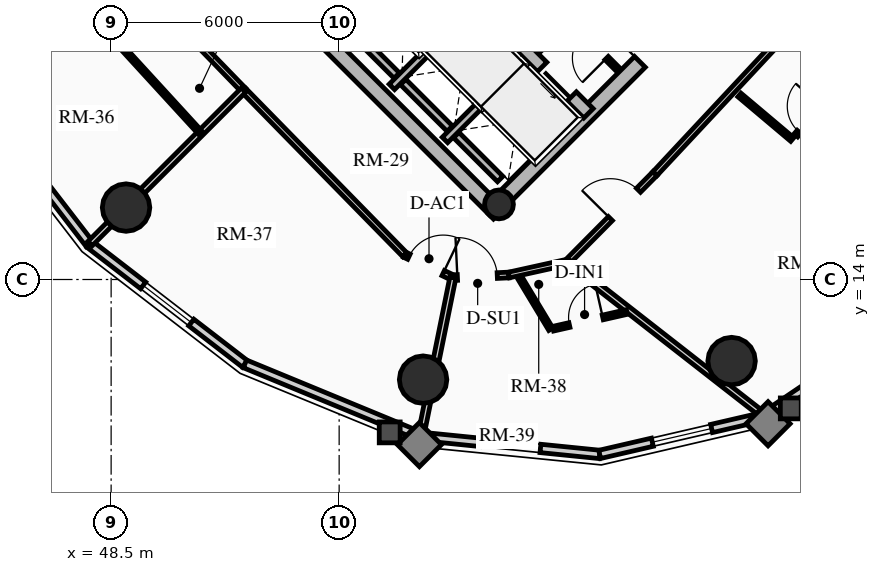
"""IFC4 building model, lengths in metres.
Left out: names, types, materials, properties, quantities, classifications, styles, units other than length and angle.
Written with IfcOpenShell. Run it as: python <this file> out.ifc"""

import sys

from ifc_helpers import new_model, si_unit, direction, frame, frame_2d, origin, origin_2d, place, context, subcontext, project, spatial, rectangle, circle, hollow_circle, extrude, source, transform, mapped, element, fill, save


model = new_model("IFC4")
c1 = context("Model", 3, precision=1e-05, world=origin(), true_north=direction((0.0, 1.0)))
c2 = subcontext(c1, "Body", "Model", "MODEL_VIEW")
j1 = project(units=[si_unit("LENGTHUNIT", "METRE"), si_unit("PLANEANGLEUNIT", "RADIAN")], contexts=[c1])
p1 = place(None, origin())
s1 = spatial("IfcSite", under=j1, at=p1, CompositionType="ELEMENT")
p2 = place(p1, origin())
s2 = spatial("IfcBuilding", under=s1, at=p2, CompositionType="ELEMENT")
p3 = place(p2, frame((0.0, 0.0, 177.79)))
s3 = spatial("IfcBuildingStorey", under=s2, at=p3, CompositionType="ELEMENT", Elevation=177.79)
p4 = place(p3, frame((58.702, 15.732, 0.0), z_axis=(0.0, 0.0, 1.0), x_axis=(-0.707106781187, 0.707106781187, 0.0)))
e1 = element("IfcWall", 1, at=p4, inside=s3, PredefinedType="SHEAR", context=c2, shape_type="SweptSolid", body=[
    extrude(rectangle(XDim=14.1, YDim=0.4, at=frame_2d((7.05, 0.0))), origin(), (0.0, 0.0, 1.0), 2.91),
])
p5 = place(p3, frame((58.561, 15.873, 0.0), z_axis=(0.0, 0.0, 1.0), x_axis=(0.707106781187, 0.707106781187, 0.0)))
e2 = element("IfcWall", 2, at=p5, inside=s3, PredefinedType="SHEAR", context=c2, shape_type="SweptSolid", body=[
    extrude(rectangle(XDim=10.7, YDim=0.4, at=frame_2d((5.35, 0.0))), origin(), (0.0, 0.0, 1.0), 2.91),
])
m1 = source(origin(), c2, "Body", "SweptSolid", [
    extrude(rectangle(XDim=1.5, YDim=2.02, at=frame_2d((0.75, 1.01))), frame((0.0, 0.21, 0.0), z_axis=(0.0, -1.0, 0.0), x_axis=(1.0, 0.0, 0.0)), (0.0, 0.0, 1.0), 0.42),
])
p6 = place(p5, frame((5.45, 0.0, 0.0)))
e3 = element("IfcOpeningElement", 3, at=p6, cuts=e2, PredefinedType="OPENING", context=c2, shape_type="MappedRepresentation", body=[
    mapped(m1, transform((0.0, 0.0, 0.0), x_axis=(1.0, 0.0, 0.0), y_axis=(0.0, 1.0, 0.0), z_axis=(0.0, 0.0, 1.0), scale=1.0)),
])
p7 = place(p3, frame((61.06, 18.373, 0.0), z_axis=(0.0, 0.0, 1.0), x_axis=(-0.707106781187, 0.707106781187, 0.0)))
e4 = element("IfcWall", 4, at=p7, inside=s3, PredefinedType="SHEAR", context=c2, shape_type="SweptSolid", body=[
    extrude(rectangle(XDim=13.7, YDim=0.35, at=frame_2d((6.85, 0.0))), origin(), (0.0, 0.0, 1.0), 2.91),
])
m2 = source(origin(), c2, "Body", "SweptSolid", [
    extrude(rectangle(XDim=1.1, YDim=2.015, at=frame_2d((0.55, 1.007))), frame((0.0, 0.185, 0.0), z_axis=(0.0, -1.0, 0.0), x_axis=(1.0, 0.0, 0.0)), (0.0, 0.0, 1.0), 0.37),
])
p8 = place(p7, frame((4.85, 0.0, 0.0)))
e5 = element("IfcOpeningElement", 5, at=p8, cuts=e4, PredefinedType="OPENING", context=c2, shape_type="MappedRepresentation", body=[
    mapped(m2, transform((0.0, 0.0, 0.0), x_axis=(1.0, 0.0, 0.0), y_axis=(0.0, 1.0, 0.0), z_axis=(0.0, 0.0, 1.0), scale=1.0)),
])
p9 = place(p7, frame((0.625, 0.0, 0.0)))
e6 = element("IfcOpeningElement", 6, at=p9, cuts=e4, PredefinedType="OPENING", context=c2, shape_type="MappedRepresentation", body=[
    mapped(m2, transform((0.0, 0.0, 0.0), x_axis=(1.0, 0.0, 0.0), y_axis=(0.0, 1.0, 0.0), z_axis=(0.0, 0.0, 1.0), scale=1.0)),
])
p10 = place(p7, frame((2.625, 0.0, 0.0)))
e7 = element("IfcOpeningElement", 7, at=p10, cuts=e4, PredefinedType="OPENING", context=c2, shape_type="MappedRepresentation", body=[
    mapped(m2, transform((0.0, 0.0, 0.0), x_axis=(1.0, 0.0, 0.0), y_axis=(0.0, 1.0, 0.0), z_axis=(0.0, 0.0, 1.0), scale=1.0)),
])
m3 = source(origin(), c2, "Body", "SweptSolid", [
    extrude(rectangle(XDim=1.15, YDim=2.02, at=frame_2d((0.575, 1.01))), frame((0.0, 0.185, 0.0), z_axis=(0.0, -1.0, 0.0), x_axis=(1.0, 0.0, 0.0)), (0.0, 0.0, 1.0), 0.37),
])
p11 = place(p7, frame((7.27, 0.0, 0.0)))
e8 = element("IfcOpeningElement", 8, at=p11, cuts=e4, PredefinedType="OPENING", context=c2, shape_type="MappedRepresentation", body=[
    mapped(m3, transform((0.0, 0.0, 0.0), x_axis=(1.0, 0.0, 0.0), y_axis=(0.0, 1.0, 0.0), z_axis=(0.0, 0.0, 1.0), scale=1.0)),
])
p12 = place(p3, frame((58.706, 15.976, 0.0), z_axis=(0.0, 0.0, 1.0), x_axis=(0.707106781187, 0.707106781187, 0.0)))
e9 = element("IfcColumn", 9, at=p12, inside=s3, PredefinedType="COLUMN", context=c2, shape_type="SweptSolid", body=[
    extrude(hollow_circle(Radius=0.38, WallThickness=0.032, at=origin_2d()), origin(), (0.0, 0.0, 1.0), 2.91),
])
for number, where, z_axis, x_axis in (
    (10, (48.893, 15.893, 0.0), (0.0, 0.0, 1.0), (1.0, 0.0, 0.0)),
    (11, (56.709, 11.365, 0.0), (0.0, 0.0, 1.0), (1.0, 0.0, 0.0)),
    (12, (64.827, 11.854, 0.0), (0.0, 0.0, 1.0), (1.0, 0.0, 0.0)),
):
    element("IfcColumn", number, at=place(p3, frame(where, z_axis=z_axis, x_axis=x_axis)), inside=s3, PredefinedType="USERDEFINED", context=c2, shape_type="SweptSolid", body=[
        extrude(circle(Radius=0.625, at=origin_2d()), origin(), (0.0, 0.0, 1.0), 2.91),
    ])
p13 = place(p3, frame((47.932, 14.932, 0.0), z_axis=(0.0, 0.0, 1.0), x_axis=(-0.610569654715, 0.791962560189, 0.0)))
e13 = element("IfcWall", 13, at=p13, inside=s3, PredefinedType="SOLIDWALL", context=c2, shape_type="SweptSolid", body=[
    extrude(rectangle(XDim=5.163, YDim=0.22, at=frame_2d((2.582, 0.0))), origin(), (0.0, 0.0, 1.0), 2.245),
])
p14 = place(p3, frame((52.021, 11.78, 0.0), z_axis=(0.0, 0.0, 1.0), x_axis=(-0.791962560189, 0.610569654715, 0.0)))
e14 = element("IfcWall", 14, at=p14, inside=s3, PredefinedType="SOLIDWALL", context=c2, shape_type="SweptSolid", body=[
    extrude(rectangle(XDim=5.163, YDim=0.22, at=frame_2d((2.582, 0.0))), origin(), (0.0, 0.0, 1.0), 2.245),
])
m4 = source(origin(), c2, "Body", "SweptSolid", [
    extrude(rectangle(XDim=1.6, YDim=1.3, at=frame_2d((0.8, 0.65))), frame((0.0, 0.12, 0.0), z_axis=(0.0, -1.0, 0.0), x_axis=(1.0, 0.0, 0.0)), (0.0, 0.0, 1.0), 0.24),
])
p15 = place(p14, frame((1.782, 0.0, 0.65)))
e15 = element("IfcOpeningElement", 15, at=p15, cuts=e14, PredefinedType="OPENING", context=c2, shape_type="MappedRepresentation", body=[
    mapped(m4, transform((0.0, 0.0, 0.0), x_axis=(1.0, 0.0, 0.0), y_axis=(0.0, 1.0, 0.0), z_axis=(0.0, 0.0, 1.0), scale=1.0)),
])
p16 = place(p3, frame((56.646, 9.873, 0.0), z_axis=(0.0, 0.0, 1.0), x_axis=(-0.924494066201, 0.381196434348, 0.0)))
e16 = element("IfcWall", 16, at=p16, inside=s3, PredefinedType="SOLIDWALL", context=c2, shape_type="SweptSolid", body=[
    extrude(rectangle(XDim=5.003, YDim=0.22, at=frame_2d((2.501, 0.0))), origin(), (0.0, 0.0, 1.0), 2.245),
])
p17 = place(p3, frame((61.355, 9.397, 0.0), z_axis=(0.0, 0.0, 1.0), x_axis=(-0.994943283129, 0.100438356004, 0.0)))
e17 = element("IfcWall", 17, at=p17, inside=s3, PredefinedType="SOLIDWALL", context=c2, shape_type="SweptSolid", body=[
    extrude(rectangle(XDim=4.733, YDim=0.22, at=frame_2d((2.366, 0.0))), origin(), (0.0, 0.0, 1.0), 2.245),
])
p18 = place(p17, frame((1.566, 0.0, 0.65)))
e18 = element("IfcOpeningElement", 18, at=p18, cuts=e17, PredefinedType="OPENING", context=c2, shape_type="MappedRepresentation", body=[
    mapped(m4, transform((0.0, 0.0, 0.0), x_axis=(1.0, 0.0, 0.0), y_axis=(0.0, 1.0, 0.0), z_axis=(0.0, 0.0, 1.0), scale=1.0)),
])
p19 = place(p3, frame((65.687, 10.4, 0.0), z_axis=(0.0, 0.0, 1.0), x_axis=(-0.97422620202, -0.22557328587, 0.0)))
e19 = element("IfcWall", 19, at=p19, inside=s3, PredefinedType="SOLIDWALL", context=c2, shape_type="SweptSolid", body=[
    extrude(rectangle(XDim=4.446, YDim=0.22, at=frame_2d((2.223, 0.0))), origin(), (0.0, 0.0, 1.0), 2.245),
])
p20 = place(p19, frame((1.423, 0.0, 0.65)))
e20 = element("IfcOpeningElement", 20, at=p20, cuts=e19, PredefinedType="OPENING", context=c2, shape_type="MappedRepresentation", body=[
    mapped(m4, transform((0.0, 0.0, 0.0), x_axis=(1.0, 0.0, 0.0), y_axis=(0.0, 1.0, 0.0), z_axis=(0.0, 0.0, 1.0), scale=1.0)),
])
p21 = place(p3, frame((69.217, 12.783, 0.0), z_axis=(0.0, 0.0, 1.0), x_axis=(-0.828817439852, -0.55951912514, 0.0)))
e21 = element("IfcWall", 21, at=p21, inside=s3, PredefinedType="SOLIDWALL", context=c2, shape_type="SweptSolid", body=[
    extrude(rectangle(XDim=4.259, YDim=0.22, at=frame_2d((2.129, 0.0))), origin(), (0.0, 0.0, 1.0), 2.245),
])
p22 = place(p3, frame((55.888, 19.069, 0.0), z_axis=(0.0, 0.0, 1.0), x_axis=(0.707106781187, 0.707106781187, 0.0)))
e22 = element("IfcWall", 22, at=p22, inside=s3, PredefinedType="SHEAR", context=c2, shape_type="SweptSolid", body=[
    extrude(rectangle(XDim=2.97, YDim=0.2, at=frame_2d((1.485, 0.0))), origin(), (0.0, 0.0, 1.0), 2.91),
])
p23 = place(p3, frame((56.015, 19.366, 0.0), z_axis=(0.0, 0.0, 1.0), x_axis=(-0.707106781187, 0.707106781187, 0.0)))
e23 = element("IfcWall", 23, at=p23, inside=s3, PredefinedType="SHEAR", context=c2, shape_type="SweptSolid", body=[
    extrude(rectangle(XDim=2.44, YDim=0.2, at=frame_2d((1.22, 0.0))), origin(), (0.0, 0.0, 1.0), 2.91),
])
p24 = place(p3, frame((57.284, 17.673, 0.0), z_axis=(0.0, 0.0, 1.0), x_axis=(0.707147878904, 0.70706568108, 0.0)))
e24 = element("IfcWall", 24, at=p24, inside=s3, PredefinedType="SHEAR", context=c2, shape_type="SweptSolid", body=[
    extrude(rectangle(XDim=2.97, YDim=0.2, at=frame_2d((1.485, 0.0))), origin(), (0.0, 0.0, 1.0), 2.91),
])
p25 = place(p3, frame((57.412, 17.97, 0.0), z_axis=(0.0, 0.0, 1.0), x_axis=(-0.707106781187, 0.707106781187, 0.0)))
e25 = element("IfcWall", 25, at=p25, inside=s3, PredefinedType="SHEAR", context=c2, shape_type="SweptSolid", body=[
    extrude(rectangle(XDim=1.735, YDim=0.2, at=frame_2d((0.867, 0.0))), origin(), (0.0, 0.0, 1.0), 2.91),
])
p26 = place(p3, frame((58.737, 16.644, 0.0), z_axis=(0.0, 0.0, 1.0), x_axis=(-0.707032117043, 0.707181437447, 0.0)))
e26 = element("IfcWall", 26, at=p26, inside=s3, PredefinedType="SHEAR", context=c2, shape_type="SweptSolid", body=[
    extrude(rectangle(XDim=1.635, YDim=0.2, at=frame_2d((0.817, 0.0))), origin(), (0.0, 0.0, 1.0), 2.91),
])
p27 = place(p3, frame((61.835, 19.529, 0.0), z_axis=(0.0, 0.0, 1.0), x_axis=(-0.707174592913, 0.707038962956, 0.0)))
e27 = element("IfcWall", 27, at=p27, inside=s3, PredefinedType="PARTITIONING", context=c2, shape_type="SweptSolid", body=[
    extrude(rectangle(XDim=1.8, YDim=0.125, at=frame_2d((0.9, 0.0))), origin(), (0.0, 0.0, 1.0), 2.675),
])
m5 = source(origin(), c2, "Body", "SweptSolid", [
    extrude(rectangle(XDim=0.9, YDim=2.005, at=frame_2d((0.45, 1.002))), frame((0.0, 0.073, 0.0), z_axis=(0.0, -1.0, 0.0), x_axis=(1.0, 0.0, 0.0)), (0.0, 0.0, 1.0), 0.145),
])
p28 = place(p27, frame((0.42, 0.0, 0.0)))
e28 = element("IfcOpeningElement", 28, at=p28, cuts=e27, PredefinedType="OPENING", context=c2, shape_type="MappedRepresentation", body=[
    mapped(m5, transform((0.0, 0.0, 0.0), x_axis=(1.0, 0.0, 0.0), y_axis=(0.0, 1.0, 0.0), z_axis=(0.0, 0.0, 1.0), scale=1.0)),
])
p29 = place(p3, frame((59.713, 19.996, 0.0), z_axis=(0.0, 0.0, 1.0), x_axis=(0.707217726, 0.706995818963, 0.0)))
e29 = element("IfcWall", 29, at=p29, inside=s3, PredefinedType="PARTITIONING", context=c2, shape_type="SweptSolid", body=[
    extrude(rectangle(XDim=1.1, YDim=0.125, at=frame_2d((0.55, 0.0))), origin(), (0.0, 0.0, 1.0), 2.675),
])
p30 = place(p3, frame((47.844, 23.253, 0.0), z_axis=(0.0, 0.0, 1.0), x_axis=(0.696248411352, -0.717800912293, 0.0)))
e30 = element("IfcWall", 30, at=p30, inside=s3, PredefinedType="PARTITIONING", context=c2, shape_type="SweptSolid", body=[
    extrude(rectangle(XDim=5.947, YDim=0.15, at=frame_2d((2.974, 0.0))), origin(), (0.0, 0.0, 1.0), 2.675),
])
p31 = place(p3, frame((51.985, 18.985, 0.0), z_axis=(0.0, 0.0, 1.0), x_axis=(0.699619654291, -0.714515457726, 0.0)))
e31 = element("IfcWall", 31, at=p31, inside=s3, PredefinedType="PARTITIONING", context=c2, shape_type="SweptSolid", body=[
    extrude(rectangle(XDim=6.064, YDim=0.15, at=frame_2d((3.032, 0.0))), origin(), (0.0, 0.0, 1.0), 2.245),
])
p32 = place(p3, frame((56.227, 14.652, 0.0), z_axis=(0.0, 0.0, 1.0), x_axis=(0.902364039563, -0.430974639745, 0.0)))
e32 = element("IfcWall", 32, at=p32, inside=s3, PredefinedType="PARTITIONING", context=c2, shape_type="SweptSolid", body=[
    extrude(rectangle(XDim=1.401, YDim=0.15, at=frame_2d((0.701, 0.0))), origin(), (0.0, 0.0, 1.0), 2.245),
])
m6 = source(origin(), c2, "Body", "SweptSolid", [
    extrude(rectangle(XDim=1.0, YDim=2.015, at=frame_2d((0.5, 1.007))), frame((0.0, 0.085, 0.0), z_axis=(0.0, -1.0, 0.0), x_axis=(1.0, 0.0, 0.0)), (0.0, 0.0, 1.0), 0.17),
])
p33 = place(p32, frame((0.12, 0.0, 0.0)))
e33 = element("IfcOpeningElement", 33, at=p33, cuts=e32, PredefinedType="OPENING", context=c2, shape_type="MappedRepresentation", body=[
    mapped(m6, transform((0.0, 0.0, 0.0), x_axis=(1.0, 0.0, 0.0), y_axis=(0.0, 1.0, 0.0), z_axis=(0.0, 0.0, 1.0), scale=1.0)),
])
p34 = place(p3, frame((57.492, 14.048, 0.0), z_axis=(0.0, 0.0, 1.0), x_axis=(0.99885011351, 0.047942160364, 0.0)))
e34 = element("IfcWall", 34, at=p34, inside=s3, PredefinedType="PARTITIONING", context=c2, shape_type="SweptSolid", body=[
    extrude(rectangle(XDim=1.477, YDim=0.15, at=frame_2d((0.738, 0.0))), origin(), (0.0, 0.0, 1.0), 2.245),
])
m7 = source(origin(), c2, "Body", "SweptSolid", [
    extrude(rectangle(XDim=1.05, YDim=2.015, at=frame_2d((0.525, 1.007))), frame((0.0, 0.085, 0.0), z_axis=(0.0, -1.0, 0.0), x_axis=(1.0, 0.0, 0.0)), (0.0, 0.0, 1.0), 0.17),
])
p35 = place(p34, frame((0.12, 0.0, 0.0)))
e35 = element("IfcOpeningElement", 35, at=p35, cuts=e34, PredefinedType="OPENING", context=c2, shape_type="MappedRepresentation", body=[
    mapped(m7, transform((0.0, 0.0, 0.0), x_axis=(1.0, 0.0, 0.0), y_axis=(0.0, 1.0, 0.0), z_axis=(0.0, 0.0, 1.0), scale=1.0)),
])
p36 = place(p3, frame((58.967, 14.118, 0.0), z_axis=(0.0, 0.0, 1.0), x_axis=(0.976471358036, 0.215647135235, 0.0)))
e36 = element("IfcWall", 36, at=p36, inside=s3, PredefinedType="PARTITIONING", context=c2, shape_type="SweptSolid", body=[
    extrude(rectangle(XDim=1.571, YDim=0.15, at=frame_2d((0.786, 0.0))), origin(), (0.0, 0.0, 1.0), 2.245),
])
p37 = place(p3, frame((60.501, 14.457, 0.0), z_axis=(0.0, 0.0, 1.0), x_axis=(0.704012266258, 0.710187812454, 0.0)))
e37 = element("IfcWall", 37, at=p37, inside=s3, PredefinedType="PARTITIONING", context=c2, shape_type="SweptSolid", body=[
    extrude(rectangle(XDim=3.281, YDim=0.15, at=frame_2d((1.641, 0.0))), origin(), (0.0, 0.0, 1.0), 2.245),
])
p38 = place(p37, frame((1.614, 0.0, 0.0)))
e38 = element("IfcOpeningElement", 38, at=p38, cuts=e37, PredefinedType="OPENING", context=c2, shape_type="MappedRepresentation", body=[
    mapped(m7, transform((0.0, 0.0, 0.0), x_axis=(1.0, 0.0, 0.0), y_axis=(0.0, 1.0, 0.0), z_axis=(0.0, 0.0, 1.0), scale=1.0)),
])
p39 = place(p3, frame((62.812, 16.788, 0.0), z_axis=(0.0, 0.0, 1.0), x_axis=(0.682323555485, 0.731050316757, 0.0)))
e39 = element("IfcWall", 39, at=p39, inside=s3, PredefinedType="PARTITIONING", context=c2, shape_type="SweptSolid", body=[
    extrude(rectangle(XDim=6.559, YDim=0.15, at=frame_2d((3.279, 0.0))), origin(), (0.0, 0.0, 1.0), 2.245),
])
p40 = place(p3, frame((51.985, 18.985, 0.0), z_axis=(0.0, 0.0, 1.0), x_axis=(-0.707106781187, -0.707106781187, 0.0)))
e40 = element("IfcWall", 40, at=p40, inside=s3, PredefinedType="PARTITIONING", context=c2, shape_type="SweptSolid", body=[
    extrude(rectangle(XDim=5.711, YDim=0.16, at=frame_2d((2.855, 0.0))), origin(), (0.0, 0.0, 1.0), 2.245),
])
p41 = place(p3, frame((57.492, 14.048, 0.0), z_axis=(0.0, 0.0, 1.0), x_axis=(-0.198717737532, -0.980056764065, 0.0)))
e41 = element("IfcWall", 41, at=p41, inside=s3, PredefinedType="PARTITIONING", context=c2, shape_type="SweptSolid", body=[
    extrude(rectangle(XDim=4.24, YDim=0.16, at=frame_2d((2.12, 0.0))), origin(), (0.0, 0.0, 1.0), 2.245),
])
p42 = place(p3, frame((60.501, 14.457, 0.0), z_axis=(0.0, 0.0, 1.0), x_axis=(0.788354052705, -0.61522181982, 0.0)))
e42 = element("IfcWall", 42, at=p42, inside=s3, PredefinedType="PARTITIONING", context=c2, shape_type="SweptSolid", body=[
    extrude(rectangle(XDim=6.566, YDim=0.16, at=frame_2d((3.283, 0.0))), origin(), (0.0, 0.0, 1.0), 2.245),
])
p43 = place(p3, frame((46.991, 22.071, 0.0), z_axis=(0.0, 0.0, 1.0), x_axis=(0.675455872419, -0.737400409828, 0.0)))
e43 = element("IfcWall", 43, at=p43, inside=s3, PredefinedType="PARTITIONING", context=c2, shape_type="SweptSolid", body=[
    extrude(rectangle(XDim=5.719, YDim=0.125, at=frame_2d((2.859, 0.0))), origin(), (0.0, 0.0, 1.0), 2.675),
])
p44 = place(p3, frame((59.265, 14.028, 0.0), z_axis=(0.0, 0.0, 1.0), x_axis=(0.515875690436, -0.856663453181, 0.0)))
e44 = element("IfcWall", 44, at=p44, inside=s3, PredefinedType="PARTITIONING", context=c2, shape_type="SweptSolid", body=[
    extrude(rectangle(XDim=1.56, YDim=0.125, at=frame_2d((0.78, 0.0))), origin(), (0.0, 0.0, 1.0), 2.245),
])
p45 = place(p3, frame((60.131, 12.705, 0.0), z_axis=(0.0, 0.0, 1.0), x_axis=(0.975184609806, 0.221393262767, 0.0)))
e45 = element("IfcWall", 45, at=p45, inside=s3, PredefinedType="PARTITIONING", context=c2, shape_type="SweptSolid", body=[
    extrude(rectangle(XDim=1.991, YDim=0.125, at=frame_2d((0.996, 0.0))), origin(), (0.0, 0.0, 1.0), 2.675),
])
p46 = place(p45, frame((0.439, 0.0, 0.0)))
e46 = element("IfcOpeningElement", 46, at=p46, cuts=e45, PredefinedType="OPENING", context=c2, shape_type="MappedRepresentation", body=[
    mapped(m5, transform((0.0, 0.0, 0.0), x_axis=(1.0, 0.0, 0.0), y_axis=(0.0, 1.0, 0.0), z_axis=(0.0, 0.0, 1.0), scale=1.0)),
])
p47 = place(p3, frame((65.033, 18.856, 0.0), z_axis=(0.0, 0.0, 1.0), x_axis=(0.764632588969, -0.644466449, 0.0)))
e47 = element("IfcWall", 47, at=p47, inside=s3, PredefinedType="PARTITIONING", context=c2, shape_type="SweptSolid", body=[
    extrude(rectangle(XDim=1.818, YDim=0.125, at=frame_2d((0.909, 0.0))), origin(), (0.0, 0.0, 1.0), 2.675),
])
p48 = place(p3, frame((66.52, 17.795, 0.0), z_axis=(0.0, 0.0, 1.0), x_axis=(0.658266024679, 0.752785388244, 0.0)))
e48 = element("IfcWall", 48, at=p48, inside=s3, PredefinedType="PARTITIONING", context=c2, shape_type="SweptSolid", body=[
    extrude(rectangle(XDim=2.826, YDim=0.125, at=frame_2d((1.413, 0.0))), origin(), (0.0, 0.0, 1.0), 2.245),
])
p49 = place(p48, frame((0.12, 0.0, 0.0)))
e49 = element("IfcOpeningElement", 49, at=p49, cuts=e48, PredefinedType="OPENING", context=c2, shape_type="MappedRepresentation", body=[
    mapped(m5, transform((0.0, 0.0, 0.0), x_axis=(1.0, 0.0, 0.0), y_axis=(0.0, 1.0, 0.0), z_axis=(0.0, 0.0, 1.0), scale=1.0)),
])
m8 = source(origin(), c2, "Body", "SweptSolid", [
    extrude(rectangle(XDim=1.6, YDim=1.3, at=frame_2d((0.8, 0.65))), frame((0.0, 0.03, 0.0), z_axis=(0.0, -1.0, 0.0), x_axis=(1.0, 0.0, 0.0)), (0.0, 0.0, 1.0), 0.06),
])
p50 = place(p15, origin())
e50 = element("IfcWindow", 50, at=p50, inside=s3, PartitioningType="SINGLE_PANEL", PredefinedType="WINDOW", context=c2, shape_type="MappedRepresentation", body=[
    mapped(m8, transform((0.0, 0.0, 0.0), x_axis=(1.0, 0.0, 0.0), y_axis=(0.0, 1.0, 0.0), z_axis=(0.0, 0.0, 1.0), scale=1.0)),
])
fill(e15, e50)
p51 = place(p18, origin())
e51 = element("IfcWindow", 51, at=p51, inside=s3, PartitioningType="SINGLE_PANEL", PredefinedType="WINDOW", context=c2, shape_type="MappedRepresentation", body=[
    mapped(m8, transform((0.0, 0.0, 0.0), x_axis=(1.0, 0.0, 0.0), y_axis=(0.0, 1.0, 0.0), z_axis=(0.0, 0.0, 1.0), scale=1.0)),
])
fill(e18, e51)
p52 = place(p20, origin())
e52 = element("IfcWindow", 52, at=p52, inside=s3, PartitioningType="SINGLE_PANEL", PredefinedType="WINDOW", context=c2, shape_type="MappedRepresentation", body=[
    mapped(m8, transform((0.0, 0.0, 0.0), x_axis=(1.0, 0.0, 0.0), y_axis=(0.0, 1.0, 0.0), z_axis=(0.0, 0.0, 1.0), scale=1.0)),
])
fill(e20, e52)
m9 = source(origin(), c2, "Body", "SweptSolid", [
    extrude(rectangle(XDim=1.1, YDim=2.015, at=frame_2d((0.55, 1.007))), frame((0.0, 0.025, 0.0), z_axis=(0.0, -1.0, 0.0), x_axis=(1.0, 0.0, 0.0)), (0.0, 0.0, 1.0), 0.05),
])
p53 = place(p9, origin())
e53 = element("IfcDoor", 53, at=p53, inside=s3, OperationType="SLIDING_TO_LEFT", PredefinedType="DOOR", context=c2, shape_type="MappedRepresentation", body=[
    mapped(m9, transform((0.0, 0.0, 0.0), x_axis=(1.0, 0.0, 0.0), y_axis=(0.0, 1.0, 0.0), z_axis=(0.0, 0.0, 1.0), scale=1.0)),
])
fill(e6, e53)
m10 = source(origin(), c2, "Body", "SweptSolid", [
    extrude(rectangle(XDim=1.5, YDim=2.02, at=frame_2d((0.75, 1.01))), frame((0.0, 0.025, 0.0), z_axis=(0.0, -1.0, 0.0), x_axis=(1.0, 0.0, 0.0)), (0.0, 0.0, 1.0), 0.05),
])
p54 = place(p6, origin())
e54 = element("IfcDoor", 54, at=p54, inside=s3, OperationType="DOUBLE_DOOR_SINGLE_SWING", PredefinedType="DOOR", context=c2, shape_type="MappedRepresentation", body=[
    mapped(m10, transform((0.0, 0.0, 0.0), x_axis=(1.0, 0.0, 0.0), y_axis=(0.0, 1.0, 0.0), z_axis=(0.0, 0.0, 1.0), scale=1.0)),
])
fill(e3, e54)
m11 = source(origin(), c2, "Body", "SweptSolid", [
    extrude(rectangle(XDim=0.9, YDim=2.005, at=frame_2d((0.45, 1.002))), frame((0.0, 0.025, 0.0), z_axis=(0.0, -1.0, 0.0), x_axis=(1.0, 0.0, 0.0)), (0.0, 0.0, 1.0), 0.05),
])
p55 = place(p28, origin())
e55 = element("IfcDoor", 55, at=p55, inside=s3, OperationType="SINGLE_SWING_LEFT", PredefinedType="DOOR", context=c2, shape_type="MappedRepresentation", body=[
    mapped(m11, transform((0.0, 0.0, 0.0), x_axis=(1.0, 0.0, 0.0), y_axis=(0.0, 1.0, 0.0), z_axis=(0.0, 0.0, 1.0), scale=1.0)),
])
fill(e28, e55)
m12 = source(origin(), c2, "Body", "SweptSolid", [
    extrude(rectangle(XDim=1.0, YDim=2.015, at=frame_2d((0.5, 1.007))), frame((0.0, 0.025, 0.0), z_axis=(0.0, -1.0, 0.0), x_axis=(1.0, 0.0, 0.0)), (0.0, 0.0, 1.0), 0.05),
])
p56 = place(p33, origin())
e56 = element("IfcDoor", 56, at=p56, inside=s3, OperationType="SINGLE_SWING_RIGHT", PredefinedType="DOOR", context=c2, shape_type="MappedRepresentation", body=[
    mapped(m12, transform((0.0, 0.0, 0.0), x_axis=(1.0, 0.0, 0.0), y_axis=(0.0, 1.0, 0.0), z_axis=(0.0, 0.0, 1.0), scale=1.0)),
])
fill(e33, e56)
m13 = source(origin(), c2, "Body", "SweptSolid", [
    extrude(rectangle(XDim=1.05, YDim=2.015, at=frame_2d((0.525, 1.007))), frame((0.0, 0.025, 0.0), z_axis=(0.0, -1.0, 0.0), x_axis=(1.0, 0.0, 0.0)), (0.0, 0.0, 1.0), 0.05),
])
p57 = place(p35, origin())
e57 = element("IfcDoor", 57, at=p57, inside=s3, OperationType="SINGLE_SWING_LEFT", PredefinedType="DOOR", context=c2, shape_type="MappedRepresentation", body=[
    mapped(m13, transform((0.0, 0.0, 0.0), x_axis=(1.0, 0.0, 0.0), y_axis=(0.0, 1.0, 0.0), z_axis=(0.0, 0.0, 1.0), scale=1.0)),
])
fill(e35, e57)
p58 = place(p46, origin())
e58 = element("IfcDoor", 58, at=p58, inside=s3, OperationType="SINGLE_SWING_RIGHT", PredefinedType="DOOR", context=c2, shape_type="MappedRepresentation", body=[
    mapped(m11, transform((0.0, 0.0, 0.0), x_axis=(1.0, 0.0, 0.0), y_axis=(0.0, 1.0, 0.0), z_axis=(0.0, 0.0, 1.0), scale=1.0)),
])
fill(e46, e58)
p59 = place(p38, origin())
e59 = element("IfcDoor", 59, at=p59, inside=s3, OperationType="SINGLE_SWING_LEFT", PredefinedType="DOOR", context=c2, shape_type="MappedRepresentation", body=[
    mapped(m13, transform((0.0, 0.0, 0.0), x_axis=(1.0, 0.0, 0.0), y_axis=(0.0, 1.0, 0.0), z_axis=(0.0, 0.0, 1.0), scale=1.0)),
])
fill(e38, e59)
p60 = place(p49, origin())
e60 = element("IfcDoor", 60, at=p60, inside=s3, OperationType="SINGLE_SWING_RIGHT", PredefinedType="DOOR", context=c2, shape_type="MappedRepresentation", body=[
    mapped(m11, transform((0.0, 0.0, 0.0), x_axis=(1.0, 0.0, 0.0), y_axis=(0.0, 1.0, 0.0), z_axis=(0.0, 0.0, 1.0), scale=1.0)),
])
fill(e49, e60)
save(model, sys.argv[1])
